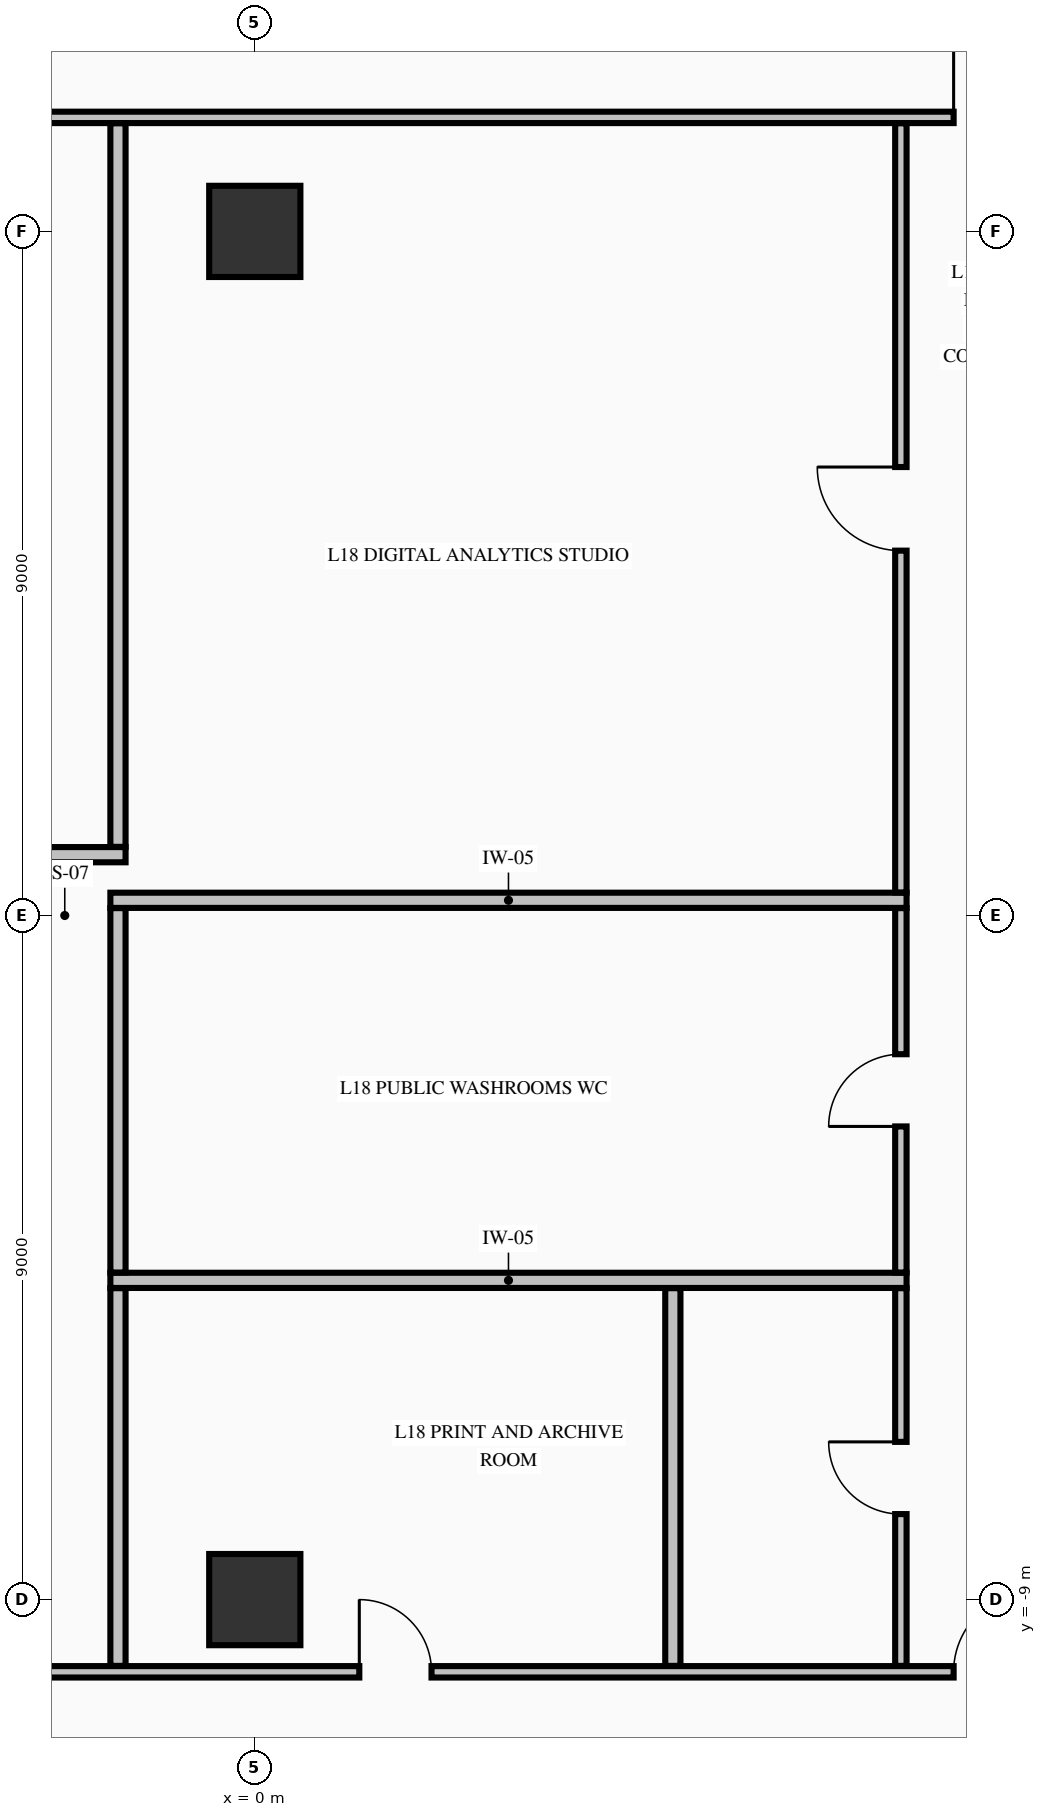
"""IFC4 building model, lengths in metres.
Left out: names, types, materials, properties, quantities, classifications, styles, units other than length and angle.
Written with IfcOpenShell. Run it as: python <this file> out.ifc"""

import sys

from ifc_helpers import new_model, si_unit, direction, frame, frame_2d, origin, origin_2d, place, context, subcontext, project, spatial, rectangle, extrude, element, fill, save


model = new_model("IFC4")
c1 = context("Model", 3, precision=1e-05, world=origin(), true_north=direction((0.0, 1.0)))
c2 = subcontext(c1, "Body", "Model", "MODEL_VIEW")
j1 = project(units=[si_unit("LENGTHUNIT", "METRE"), si_unit("PLANEANGLEUNIT", "RADIAN")], contexts=[c1])
p1 = place(None, origin())
s1 = spatial("IfcSite", under=j1, at=p1, CompositionType="ELEMENT")
p2 = place(p1, origin())
s2 = spatial("IfcBuilding", under=s1, at=p2, CompositionType="ELEMENT")
p3 = place(p2, frame((0.0, 0.0, 75.04)))
s3 = spatial("IfcBuildingStorey", under=s2, at=p3, CompositionType="ELEMENT", Elevation=75.04)
for number, where, z_axis, x_axis in (
    (1, (0.0, -9.0, -0.25), (0.0, 0.0, 1.0), (1.0, 0.0, 0.0)),
    (2, (0.0, 9.0, -0.25), (0.0, 0.0, 1.0), (1.0, 0.0, 0.0)),
):
    element("IfcColumn", number, at=place(p3, frame(where, z_axis=z_axis, x_axis=x_axis)), inside=s3, PredefinedType="COLUMN", context=c2, shape_type="SweptSolid", body=[
        extrude(rectangle(XDim=1.2, YDim=1.2, at=origin_2d()), origin(), (0.0, 0.0, 1.0), 3.57),
    ])
p4 = place(p3, frame((-10.394, -9.95, 0.0), z_axis=(0.0, 0.0, 1.0), x_axis=(1.0, 0.0, 0.0)))
e3 = element("IfcWall", 3, at=p4, inside=s3, PredefinedType="PARTITIONING", context=c2, shape_type="SweptSolid", body=[
    extrude(rectangle(XDim=20.788, YDim=0.15, at=frame_2d((10.394, 0.0))), origin(), (0.0, 0.0, 1.0), 3.32),
])
p5 = place(p4, frame((0.15, 0.0, 0.0)))
e4 = element("IfcOpeningElement", 4, at=p5, cuts=e3, PredefinedType="OPENING", context=c2, shape_type="SweptSolid", body=[
    extrude(rectangle(XDim=1.05, YDim=2.15, at=frame_2d((0.525, 1.075))), frame((0.0, 0.085, 0.0), z_axis=(0.0, -1.0, 0.0), x_axis=(1.0, 0.0, 0.0)), (0.0, 0.0, 1.0), 0.17),
])
p6 = place(p4, frame((19.588, 0.0, 0.0)))
e5 = element("IfcOpeningElement", 5, at=p6, cuts=e3, PredefinedType="OPENING", context=c2, shape_type="SweptSolid", body=[
    extrude(rectangle(XDim=1.05, YDim=2.15, at=frame_2d((0.525, 1.075))), frame((0.0, 0.085, 0.0), z_axis=(0.0, -1.0, 0.0), x_axis=(1.0, 0.0, 0.0)), (0.0, 0.0, 1.0), 0.17),
])
p7 = place(p4, frame((11.769, 0.0, 0.0)))
e6 = element("IfcOpeningElement", 6, at=p7, cuts=e3, PredefinedType="OPENING", context=c2, shape_type="SweptSolid", body=[
    extrude(rectangle(XDim=0.95, YDim=2.15, at=frame_2d((0.475, 1.075))), frame((0.0, 0.085, 0.0), z_axis=(0.0, -1.0, 0.0), x_axis=(1.0, 0.0, 0.0)), (0.0, 0.0, 1.0), 0.17),
])
for number, where, z_axis, x_axis in (
    (7, (-1.9, -4.8, 0.0), (0.0, 0.0, 1.0), (1.0, 0.0, 0.0)),
    (8, (-1.9, 0.2, 0.0), (0.0, 0.0, 1.0), (1.0, 0.0, 0.0)),
):
    element("IfcWall", number, at=place(p3, frame(where, z_axis=z_axis, x_axis=x_axis)), inside=s3, PredefinedType="PARTITIONING", context=c2, shape_type="SweptSolid", body=[
        extrude(rectangle(XDim=10.475, YDim=0.2, at=frame_2d((5.237, 0.0))), origin(), (0.0, 0.0, 1.0), 3.32),
    ])
p8 = place(p3, frame((-8.575, 0.8, 0.0), z_axis=(0.0, 0.0, 1.0), x_axis=(1.0, 0.0, 0.0)))
e9 = element("IfcWall", 9, at=p8, inside=s3, PredefinedType="PARTITIONING", context=c2, shape_type="SweptSolid", body=[
    extrude(rectangle(XDim=6.875, YDim=0.2, at=frame_2d((3.438, 0.0))), origin(), (0.0, 0.0, 1.0), 3.32),
])
p9 = place(p3, frame((-10.394, 10.5, 0.0), z_axis=(0.0, 0.0, 1.0), x_axis=(1.0, 0.0, 0.0)))
e10 = element("IfcWall", 10, at=p9, inside=s3, PredefinedType="PARTITIONING", context=c2, shape_type="SweptSolid", body=[
    extrude(rectangle(XDim=20.788, YDim=0.15, at=frame_2d((10.394, 0.0))), origin(), (0.0, 0.0, 1.0), 3.32),
])
p10 = place(p9, frame((0.15, 0.0, 0.0)))
e11 = element("IfcOpeningElement", 11, at=p10, cuts=e10, PredefinedType="OPENING", context=c2, shape_type="SweptSolid", body=[
    extrude(rectangle(XDim=1.05, YDim=2.15, at=frame_2d((0.525, 1.075))), frame((0.0, 0.085, 0.0), z_axis=(0.0, -1.0, 0.0), x_axis=(1.0, 0.0, 0.0)), (0.0, 0.0, 1.0), 0.17),
])
p11 = place(p9, frame((19.588, 0.0, 0.0)))
e12 = element("IfcOpeningElement", 12, at=p11, cuts=e10, PredefinedType="OPENING", context=c2, shape_type="SweptSolid", body=[
    extrude(rectangle(XDim=1.05, YDim=2.15, at=frame_2d((0.525, 1.075))), frame((0.0, 0.085, 0.0), z_axis=(0.0, -1.0, 0.0), x_axis=(1.0, 0.0, 0.0)), (0.0, 0.0, 1.0), 0.17),
])
p12 = place(p3, frame((-1.8, -9.872, 0.0), z_axis=(0.0, 0.0, 1.0), x_axis=(0.0, 1.0, 0.0)))
e13 = element("IfcWall", 13, at=p12, inside=s3, PredefinedType="PARTITIONING", context=c2, shape_type="SweptSolid", body=[
    extrude(rectangle(XDim=4.969, YDim=0.2, at=frame_2d((2.484, 0.0))), origin(), (0.0, 0.0, 1.0), 3.32),
])
p13 = place(p3, frame((-1.8, -4.697, 0.0), z_axis=(0.0, 0.0, 1.0), x_axis=(0.0, 1.0, 0.0)))
e14 = element("IfcWall", 14, at=p13, inside=s3, PredefinedType="PARTITIONING", context=c2, shape_type="SweptSolid", body=[
    extrude(rectangle(XDim=4.794, YDim=0.2, at=frame_2d((2.397, 0.0))), origin(), (0.0, 0.0, 1.0), 3.32),
])
p14 = place(p3, frame((-1.8, 0.903, 0.0), z_axis=(0.0, 0.0, 1.0), x_axis=(0.0, 1.0, 0.0)))
e15 = element("IfcWall", 15, at=p14, inside=s3, PredefinedType="PARTITIONING", context=c2, shape_type="SweptSolid", body=[
    extrude(rectangle(XDim=9.519, YDim=0.2, at=frame_2d((4.76, 0.0))), origin(), (0.0, 0.0, 1.0), 3.32),
])
p15 = place(p3, frame((5.5, -9.872, 0.0), z_axis=(0.0, 0.0, 1.0), x_axis=(0.0, 1.0, 0.0)))
e16 = element("IfcWall", 16, at=p15, inside=s3, PredefinedType="PARTITIONING", context=c2, shape_type="SweptSolid", body=[
    extrude(rectangle(XDim=4.969, YDim=0.2, at=frame_2d((2.484, 0.0))), origin(), (0.0, 0.0, 1.0), 3.32),
])
p16 = place(p3, frame((8.5, -9.872, 0.0), z_axis=(0.0, 0.0, 1.0), x_axis=(0.0, 1.0, 0.0)))
e17 = element("IfcWall", 17, at=p16, inside=s3, PredefinedType="PARTITIONING", context=c2, shape_type="SweptSolid", body=[
    extrude(rectangle(XDim=4.969, YDim=0.15, at=frame_2d((2.484, 0.0))), origin(), (0.0, 0.0, 1.0), 3.32),
])
p17 = place(p16, frame((1.997, 0.0, 0.0)))
e18 = element("IfcOpeningElement", 18, at=p17, cuts=e17, PredefinedType="OPENING", context=c2, shape_type="SweptSolid", body=[
    extrude(rectangle(XDim=0.95, YDim=2.15, at=frame_2d((0.475, 1.075))), frame((0.0, 0.085, 0.0), z_axis=(0.0, -1.0, 0.0), x_axis=(1.0, 0.0, 0.0)), (0.0, 0.0, 1.0), 0.17),
])
p18 = place(p3, frame((8.5, -4.697, 0.0), z_axis=(0.0, 0.0, 1.0), x_axis=(0.0, 1.0, 0.0)))
e19 = element("IfcWall", 19, at=p18, inside=s3, PredefinedType="PARTITIONING", context=c2, shape_type="SweptSolid", body=[
    extrude(rectangle(XDim=4.794, YDim=0.15, at=frame_2d((2.397, 0.0))), origin(), (0.0, 0.0, 1.0), 3.32),
])
p19 = place(p18, frame((1.922, 0.0, 0.0)))
e20 = element("IfcOpeningElement", 20, at=p19, cuts=e19, PredefinedType="OPENING", context=c2, shape_type="SweptSolid", body=[
    extrude(rectangle(XDim=0.95, YDim=2.15, at=frame_2d((0.475, 1.075))), frame((0.0, 0.085, 0.0), z_axis=(0.0, -1.0, 0.0), x_axis=(1.0, 0.0, 0.0)), (0.0, 0.0, 1.0), 0.17),
])
p20 = place(p3, frame((8.5, 0.303, 0.0), z_axis=(0.0, 0.0, 1.0), x_axis=(0.0, 1.0, 0.0)))
e21 = element("IfcWall", 21, at=p20, inside=s3, PredefinedType="PARTITIONING", context=c2, shape_type="SweptSolid", body=[
    extrude(rectangle(XDim=10.119, YDim=0.15, at=frame_2d((5.06, 0.0))), origin(), (0.0, 0.0, 1.0), 3.32),
])
p21 = place(p20, frame((4.497, 0.0, 0.0)))
e22 = element("IfcOpeningElement", 22, at=p21, cuts=e21, PredefinedType="OPENING", context=c2, shape_type="SweptSolid", body=[
    extrude(rectangle(XDim=1.1, YDim=2.15, at=frame_2d((0.55, 1.075))), frame((0.0, 0.085, 0.0), z_axis=(0.0, -1.0, 0.0), x_axis=(1.0, 0.0, 0.0)), (0.0, 0.0, 1.0), 0.17),
])
p22 = place(p11, origin())
e23 = element("IfcDoor", 23, at=p22, inside=s3, OperationType="SINGLE_SWING_LEFT", PredefinedType="DOOR", context=c2, shape_type="SweptSolid", body=[
    extrude(rectangle(XDim=1.05, YDim=2.15, at=frame_2d((0.525, 1.075))), frame((0.0, 0.025, 0.0), z_axis=(0.0, -1.0, 0.0), x_axis=(1.0, 0.0, 0.0)), (0.0, 0.0, 1.0), 0.05),
])
fill(e12, e23)
p23 = place(p6, origin())
e24 = element("IfcDoor", 24, at=p23, inside=s3, OperationType="SINGLE_SWING_RIGHT", PredefinedType="DOOR", context=c2, shape_type="SweptSolid", body=[
    extrude(rectangle(XDim=1.05, YDim=2.15, at=frame_2d((0.525, 1.075))), frame((0.0, 0.025, 0.0), z_axis=(0.0, -1.0, 0.0), x_axis=(1.0, 0.0, 0.0)), (0.0, 0.0, 1.0), 0.05),
])
fill(e5, e24)
p24 = place(p21, origin())
e25 = element("IfcDoor", 25, at=p24, inside=s3, OperationType="SINGLE_SWING_RIGHT", PredefinedType="DOOR", context=c2, shape_type="SweptSolid", body=[
    extrude(rectangle(XDim=1.1, YDim=2.15, at=frame_2d((0.55, 1.075))), frame((0.0, 0.025, 0.0), z_axis=(0.0, -1.0, 0.0), x_axis=(1.0, 0.0, 0.0)), (0.0, 0.0, 1.0), 0.05),
])
fill(e22, e25)
p25 = place(p19, origin())
e26 = element("IfcDoor", 26, at=p25, inside=s3, OperationType="SINGLE_SWING_LEFT", PredefinedType="DOOR", context=c2, shape_type="SweptSolid", body=[
    extrude(rectangle(XDim=0.95, YDim=2.15, at=frame_2d((0.475, 1.075))), frame((0.0, 0.025, 0.0), z_axis=(0.0, -1.0, 0.0), x_axis=(1.0, 0.0, 0.0)), (0.0, 0.0, 1.0), 0.05),
])
fill(e20, e26)
p26 = place(p17, origin())
e27 = element("IfcDoor", 27, at=p26, inside=s3, OperationType="SINGLE_SWING_RIGHT", PredefinedType="DOOR", context=c2, shape_type="SweptSolid", body=[
    extrude(rectangle(XDim=0.95, YDim=2.15, at=frame_2d((0.475, 1.075))), frame((0.0, 0.025, 0.0), z_axis=(0.0, -1.0, 0.0), x_axis=(1.0, 0.0, 0.0)), (0.0, 0.0, 1.0), 0.05),
])
fill(e18, e27)
p27 = place(p7, origin())
e28 = element("IfcDoor", 28, at=p27, inside=s3, OperationType="SINGLE_SWING_LEFT", PredefinedType="DOOR", context=c2, shape_type="SweptSolid", body=[
    extrude(rectangle(XDim=0.95, YDim=2.15, at=frame_2d((0.475, 1.075))), frame((0.0, 0.025, 0.0), z_axis=(0.0, -1.0, 0.0), x_axis=(1.0, 0.0, 0.0)), (0.0, 0.0, 1.0), 0.05),
])
fill(e6, e28)
save(model, sys.argv[1])
